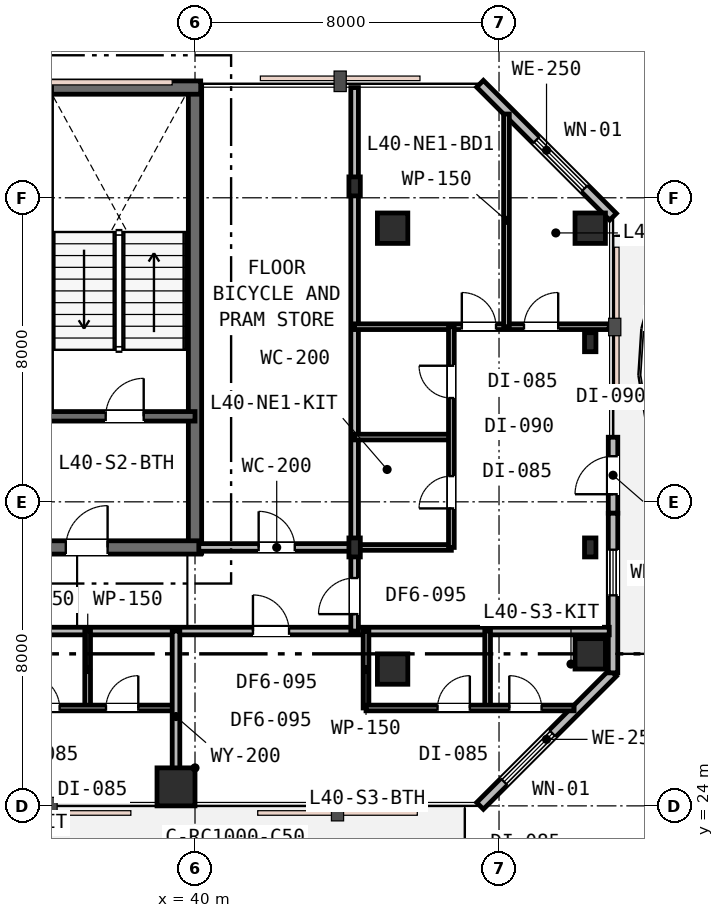
"""IFC4 building model, lengths in metres.
Left out: names, types, materials, properties, quantities, classifications, styles, units other than length and angle.
Written with IfcOpenShell. Run it as: python <this file> out.ifc"""

import sys

from ifc_helpers import new_model, si_unit, direction, frame, frame_2d, origin, origin_2d, place, context, subcontext, project, spatial, rectangle, i_section, extrude, element, fill, save


model = new_model("IFC4")
c1 = context("Model", 3, precision=1e-05, world=origin(), true_north=direction((0.0, 1.0)))
c2 = subcontext(c1, "Body", "Model", "MODEL_VIEW")
j1 = project(units=[si_unit("LENGTHUNIT", "METRE"), si_unit("PLANEANGLEUNIT", "RADIAN")], contexts=[c1])
p1 = place(None, origin())
s1 = spatial("IfcSite", under=j1, at=p1, CompositionType="ELEMENT")
p2 = place(p1, origin())
s2 = spatial("IfcBuilding", under=s1, at=p2, CompositionType="ELEMENT")
p3 = place(p2, frame((0.0, 0.0, 157.8)))
s3 = spatial("IfcBuildingStorey", under=s2, at=p3, CompositionType="ELEMENT", Elevation=157.8)
p4 = place(p3, frame((40.0, 30.65, 0.0), z_axis=(0.0, 0.0, 1.0), x_axis=(0.0, 1.0, 0.0)))
e1 = element("IfcWall", 1, at=p4, inside=s3, PredefinedType="SHEAR", context=c2, shape_type="SweptSolid", body=[
    extrude(rectangle(XDim=12.3, YDim=0.35, at=frame_2d((6.15, 0.0))), origin(), (0.0, 0.0, 1.0), 3.6),
])
p5 = place(p3, frame((15.85, 42.9, 0.0), z_axis=(0.0, 0.0, 1.0), x_axis=(1.0, 0.0, 0.0)))
e2 = element("IfcWall", 2, at=p5, inside=s3, PredefinedType="SHEAR", context=c2, shape_type="SweptSolid", body=[
    extrude(rectangle(XDim=24.3, YDim=0.35, at=frame_2d((12.15, 0.0))), origin(), (0.0, 0.0, 1.0), 3.6),
])
p6 = place(p3, frame((28.95, 30.8, 0.0), z_axis=(0.0, 0.0, 1.0), x_axis=(1.0, 0.0, 0.0)))
e3 = element("IfcWall", 3, at=p6, inside=s3, PredefinedType="SHEAR", context=c2, shape_type="SweptSolid", body=[
    extrude(rectangle(XDim=11.2, YDim=0.35, at=frame_2d((5.6, 0.0))), origin(), (0.0, 0.0, 1.0), 3.6),
])
p7 = place(p6, frame((7.65, 0.0, 0.0)))
e4 = element("IfcOpeningElement", 4, at=p7, cuts=e3, PredefinedType="OPENING", context=c2, shape_type="SweptSolid", body=[
    extrude(rectangle(XDim=1.1, YDim=2.15, at=frame_2d((0.55, 1.075))), frame((0.0, 0.185, 0.0), z_axis=(0.0, -1.0, 0.0), x_axis=(1.0, 0.0, 0.0)), (0.0, 0.0, 1.0), 0.37),
])
p8 = place(p3, frame((33.95, 34.25, 0.0), z_axis=(0.0, 0.0, 1.0), x_axis=(1.0, 0.0, 0.0)))
e5 = element("IfcWall", 5, at=p8, inside=s3, PredefinedType="SHEAR", context=c2, shape_type="SweptSolid", body=[
    extrude(rectangle(XDim=6.05, YDim=0.25, at=frame_2d((3.025, 0.0))), origin(), (0.0, 0.0, 1.0), 3.6),
])
p9 = place(p8, frame((3.7, 0.0, 0.0)))
e6 = element("IfcOpeningElement", 6, at=p9, cuts=e5, PredefinedType="OPENING", context=c2, shape_type="SweptSolid", body=[
    extrude(rectangle(XDim=1.0, YDim=2.15, at=frame_2d((0.5, 1.075))), frame((0.0, 0.135, 0.0), z_axis=(0.0, -1.0, 0.0), x_axis=(1.0, 0.0, 0.0)), (0.0, 0.0, 1.0), 0.27),
])
p10 = place(p8, frame((0.55, 0.0, 0.0)))
e7 = element("IfcOpeningElement", 7, at=p10, cuts=e5, PredefinedType="OPENING", context=c2, shape_type="SweptSolid", body=[
    extrude(rectangle(XDim=1.1, YDim=2.15, at=frame_2d((0.55, 1.075))), frame((0.0, 0.135, 0.0), z_axis=(0.0, -1.0, 0.0), x_axis=(1.0, 0.0, 0.0)), (0.0, 0.0, 1.0), 0.27),
])
p11 = place(p3, frame((39.5, 24.5, 0.0), z_axis=(0.0, 0.0, 1.0), x_axis=(1.0, 0.0, 0.0)))
e8 = element("IfcColumn", 8, at=p11, inside=s3, PredefinedType="COLUMN", context=c2, shape_type="SweptSolid", body=[
    extrude(rectangle(XDim=1.0, YDim=1.0, at=origin_2d()), origin(), (0.0, 0.0, 1.0), 3.6),
])
for number, where, z_axis, x_axis in (
    (9, (45.2, 27.6, 0.0), (0.0, 0.0, 1.0), (1.0, 0.0, 0.0)),
    (10, (45.2, 39.2, 0.0), (0.0, 0.0, 1.0), (1.0, 0.0, 0.0)),
    (11, (50.4, 28.0, 0.0), (0.0, 0.0, 1.0), (1.0, 0.0, 0.0)),
    (12, (50.4, 39.2, 0.0), (0.0, 0.0, 1.0), (1.0, 0.0, 0.0)),
):
    element("IfcColumn", number, at=place(p3, frame(where, z_axis=z_axis, x_axis=x_axis)), inside=s3, PredefinedType="COLUMN", context=c2, shape_type="SweptSolid", body=[
        extrude(rectangle(XDim=0.8, YDim=0.8, at=origin_2d()), origin(), (0.0, 0.0, 1.0), 3.6),
    ])
for number, where, z_axis, x_axis in (
    (13, (44.2, 30.8, 0.0), (0.0, 0.0, 1.0), (1.0, 0.0, 0.0)),
    (14, (44.2, 40.3, 0.0), (0.0, 0.0, 1.0), (1.0, 0.0, 0.0)),
    (15, (50.4, 30.8, 0.0), (0.0, 0.0, 1.0), (1.0, 0.0, 0.0)),
    (16, (50.4, 36.2, 0.0), (0.0, 0.0, 1.0), (1.0, 0.0, 0.0)),
):
    element("IfcColumn", number, at=place(p3, frame(where, z_axis=z_axis, x_axis=x_axis)), inside=s3, PredefinedType="COLUMN", context=c2, shape_type="SweptSolid", body=[
        extrude(i_section(OverallWidth=0.3, OverallDepth=0.5, WebThickness=0.015, FlangeThickness=0.028, FilletRadius=0.027, at=origin_2d()), origin(), (0.0, 0.0, 1.0), 3.6),
    ])
p12 = place(p3, frame((47.5, 24.0, 0.0), z_axis=(0.0, 0.0, 1.0), x_axis=(0.707106781187, 0.707106781187, 0.0)))
e17 = element("IfcWall", 17, at=p12, inside=s3, PredefinedType="STANDARD", context=c2, shape_type="SweptSolid", body=[
    extrude(rectangle(XDim=4.95, YDim=0.25, at=frame_2d((2.475, 0.0))), origin(), (0.0, 0.0, 1.0), 3.33),
])
p13 = place(p12, frame((0.896, 0.0, 0.75)))
e18 = element("IfcOpeningElement", 18, at=p13, cuts=e17, PredefinedType="OPENING", context=c2, shape_type="SweptSolid", body=[
    extrude(rectangle(XDim=1.8, YDim=1.85, at=frame_2d((0.9, 0.925))), frame((0.0, 0.135, 0.0), z_axis=(0.0, -1.0, 0.0), x_axis=(1.0, 0.0, 0.0)), (0.0, 0.0, 1.0), 0.27),
])
p14 = place(p3, frame((51.0, 31.7, 0.0), z_axis=(0.0, 0.0, 1.0), x_axis=(0.0, 1.0, 0.0)))
e19 = element("IfcWall", 19, at=p14, inside=s3, PredefinedType="STANDARD", context=c2, shape_type="SweptSolid", body=[
    extrude(rectangle(XDim=2.0, YDim=0.25, at=frame_2d((1.0, 0.0))), origin(), (0.0, 0.0, 1.0), 3.33),
])
p15 = place(p14, frame((0.5, 0.0, 0.0)))
e20 = element("IfcOpeningElement", 20, at=p15, cuts=e19, PredefinedType="OPENING", context=c2, shape_type="SweptSolid", body=[
    extrude(rectangle(XDim=1.0, YDim=2.15, at=frame_2d((0.5, 1.075))), frame((0.0, 0.135, 0.0), z_axis=(0.0, -1.0, 0.0), x_axis=(1.0, 0.0, 0.0)), (0.0, 0.0, 1.0), 0.27),
])
p16 = place(p3, frame((51.0, 27.5, 0.0), z_axis=(0.0, 0.0, 1.0), x_axis=(0.0, 1.0, 0.0)))
e21 = element("IfcWall", 21, at=p16, inside=s3, PredefinedType="STANDARD", context=c2, shape_type="SweptSolid", body=[
    extrude(rectangle(XDim=4.2, YDim=0.25, at=frame_2d((2.1, 0.0))), origin(), (0.0, 0.0, 1.0), 3.33),
])
p17 = place(p16, frame((2.04, 0.0, 0.85)))
e22 = element("IfcOpeningElement", 22, at=p17, cuts=e21, PredefinedType="OPENING", context=c2, shape_type="SweptSolid", body=[
    extrude(rectangle(XDim=1.2, YDim=1.6, at=frame_2d((0.6, 0.8))), frame((0.0, 0.135, 0.0), z_axis=(0.0, -1.0, 0.0), x_axis=(1.0, 0.0, 0.0)), (0.0, 0.0, 1.0), 0.27),
])
p18 = place(p3, frame((51.0, 39.5, 0.0), z_axis=(0.0, 0.0, 1.0), x_axis=(-0.707106781187, 0.707106781187, 0.0)))
e23 = element("IfcWall", 23, at=p18, inside=s3, PredefinedType="STANDARD", context=c2, shape_type="SweptSolid", body=[
    extrude(rectangle(XDim=4.95, YDim=0.25, at=frame_2d((2.475, 0.0))), origin(), (0.0, 0.0, 1.0), 3.33),
])
p19 = place(p18, frame((1.057, 0.0, 0.75)))
e24 = element("IfcOpeningElement", 24, at=p19, cuts=e23, PredefinedType="OPENING", context=c2, shape_type="SweptSolid", body=[
    extrude(rectangle(XDim=1.8, YDim=1.85, at=frame_2d((0.9, 0.925))), frame((0.0, 0.135, 0.0), z_axis=(0.0, -1.0, 0.0), x_axis=(1.0, 0.0, 0.0)), (0.0, 0.0, 1.0), 0.27),
])
p20 = place(p3, frame((19.6, 28.6, 0.0), z_axis=(0.0, 0.0, 1.0), x_axis=(1.0, 0.0, 0.0)))
e25 = element("IfcWall", 25, at=p20, inside=s3, PredefinedType="PARTITIONING", context=c2, shape_type="SweptSolid", body=[
    extrude(rectangle(XDim=31.3, YDim=0.2, at=frame_2d((15.65, 0.0))), origin(), (0.0, 0.0, 1.0), 2.93),
])
p21 = place(p20, frame((5.445, 0.0, 0.0)))
e26 = element("IfcOpeningElement", 26, at=p21, cuts=e25, PredefinedType="OPENING", context=c2, shape_type="SweptSolid", body=[
    extrude(rectangle(XDim=0.95, YDim=2.15, at=frame_2d((0.475, 1.075))), frame((0.0, 0.11, 0.0), z_axis=(0.0, -1.0, 0.0), x_axis=(1.0, 0.0, 0.0)), (0.0, 0.0, 1.0), 0.22),
])
p22 = place(p20, frame((13.35, 0.0, 0.0)))
e27 = element("IfcOpeningElement", 27, at=p22, cuts=e25, PredefinedType="OPENING", context=c2, shape_type="SweptSolid", body=[
    extrude(rectangle(XDim=0.95, YDim=2.15, at=frame_2d((0.475, 1.075))), frame((0.0, 0.11, 0.0), z_axis=(0.0, -1.0, 0.0), x_axis=(1.0, 0.0, 0.0)), (0.0, 0.0, 1.0), 0.22),
])
p23 = place(p20, frame((21.925, 0.0, 0.0)))
e28 = element("IfcOpeningElement", 28, at=p23, cuts=e25, PredefinedType="OPENING", context=c2, shape_type="SweptSolid", body=[
    extrude(rectangle(XDim=0.95, YDim=2.15, at=frame_2d((0.475, 1.075))), frame((0.0, 0.11, 0.0), z_axis=(0.0, -1.0, 0.0), x_axis=(1.0, 0.0, 0.0)), (0.0, 0.0, 1.0), 0.22),
])
p24 = place(p3, frame((40.1, 30.8, 0.0), z_axis=(0.0, 0.0, 1.0), x_axis=(1.0, 0.0, 0.0)))
e29 = element("IfcWall", 29, at=p24, inside=s3, PredefinedType="PARTITIONING", context=c2, shape_type="SweptSolid", body=[
    extrude(rectangle(XDim=4.1, YDim=0.2, at=frame_2d((2.05, 0.0))), origin(), (0.0, 0.0, 1.0), 2.93),
])
p25 = place(p24, frame((1.575, 0.0, 0.0)))
e30 = element("IfcOpeningElement", 30, at=p25, cuts=e29, PredefinedType="OPENING", context=c2, shape_type="SweptSolid", body=[
    extrude(rectangle(XDim=0.95, YDim=2.15, at=frame_2d((0.475, 1.075))), frame((0.0, 0.11, 0.0), z_axis=(0.0, -1.0, 0.0), x_axis=(1.0, 0.0, 0.0)), (0.0, 0.0, 1.0), 0.22),
])
p26 = place(p3, frame((44.2, 28.6, 0.0), z_axis=(0.0, 0.0, 1.0), x_axis=(0.0, 1.0, 0.0)))
e31 = element("IfcWall", 31, at=p26, inside=s3, PredefinedType="PARTITIONING", context=c2, shape_type="SweptSolid", body=[
    extrude(rectangle(XDim=14.3, YDim=0.2, at=frame_2d((7.15, 0.0))), origin(), (0.0, 0.0, 1.0), 2.93),
])
p27 = place(p26, frame((0.445, 0.0, 0.0)))
e32 = element("IfcOpeningElement", 32, at=p27, cuts=e31, PredefinedType="OPENING", context=c2, shape_type="SweptSolid", body=[
    extrude(rectangle(XDim=0.95, YDim=2.15, at=frame_2d((0.475, 1.075))), frame((0.0, 0.11, 0.0), z_axis=(0.0, -1.0, 0.0), x_axis=(1.0, 0.0, 0.0)), (0.0, 0.0, 1.0), 0.22),
])
for number, where, z_axis, x_axis in (
    (33, (44.2, 30.8, 0.0), (0.0, 0.0, 1.0), (1.0, 0.0, 0.0)),
    (34, (44.2, 33.704, 0.0), (0.0, 0.0, 1.0), (1.0, 0.0, 0.0)),
):
    element("IfcWall", number, at=place(p3, frame(where, z_axis=z_axis, x_axis=x_axis)), inside=s3, PredefinedType="PARTITIONING", context=c2, shape_type="SweptSolid", body=[
        extrude(rectangle(XDim=2.546, YDim=0.15, at=frame_2d((1.273, 0.0))), origin(), (0.0, 0.0, 1.0), 2.93),
    ])
p28 = place(p3, frame((44.2, 36.608, 0.0), z_axis=(0.0, 0.0, 1.0), x_axis=(1.0, 0.0, 0.0)))
e35 = element("IfcWall", 35, at=p28, inside=s3, PredefinedType="PARTITIONING", context=c2, shape_type="SweptSolid", body=[
    extrude(rectangle(XDim=6.7, YDim=0.15, at=frame_2d((3.35, 0.0))), origin(), (0.0, 0.0, 1.0), 2.93),
])
p29 = place(p28, frame((2.821, 0.0, 0.0)))
e36 = element("IfcOpeningElement", 36, at=p29, cuts=e35, PredefinedType="OPENING", context=c2, shape_type="SweptSolid", body=[
    extrude(rectangle(XDim=0.9, YDim=2.15, at=frame_2d((0.45, 1.075))), frame((0.0, 0.085, 0.0), z_axis=(0.0, -1.0, 0.0), x_axis=(1.0, 0.0, 0.0)), (0.0, 0.0, 1.0), 0.17),
])
p30 = place(p28, frame((4.457, 0.0, 0.0)))
e37 = element("IfcOpeningElement", 37, at=p30, cuts=e35, PredefinedType="OPENING", context=c2, shape_type="SweptSolid", body=[
    extrude(rectangle(XDim=0.9, YDim=2.15, at=frame_2d((0.45, 1.075))), frame((0.0, 0.085, 0.0), z_axis=(0.0, -1.0, 0.0), x_axis=(1.0, 0.0, 0.0)), (0.0, 0.0, 1.0), 0.17),
])
p31 = place(p3, frame((46.746, 30.8, 0.0), z_axis=(0.0, 0.0, 1.0), x_axis=(0.0, 1.0, 0.0)))
e38 = element("IfcWall", 38, at=p31, inside=s3, PredefinedType="PARTITIONING", context=c2, shape_type="SweptSolid", body=[
    extrude(rectangle(XDim=5.808, YDim=0.15, at=frame_2d((2.904, 0.0))), origin(), (0.0, 0.0, 1.0), 2.93),
])
p32 = place(p31, frame((1.027, 0.0, 0.0)))
e39 = element("IfcOpeningElement", 39, at=p32, cuts=e38, PredefinedType="OPENING", context=c2, shape_type="SweptSolid", body=[
    extrude(rectangle(XDim=0.85, YDim=2.15, at=frame_2d((0.425, 1.075))), frame((0.0, 0.085, 0.0), z_axis=(0.0, -1.0, 0.0), x_axis=(1.0, 0.0, 0.0)), (0.0, 0.0, 1.0), 0.17),
])
p33 = place(p31, frame((3.931, 0.0, 0.0)))
e40 = element("IfcOpeningElement", 40, at=p33, cuts=e38, PredefinedType="OPENING", context=c2, shape_type="SweptSolid", body=[
    extrude(rectangle(XDim=0.85, YDim=2.15, at=frame_2d((0.425, 1.075))), frame((0.0, 0.085, 0.0), z_axis=(0.0, -1.0, 0.0), x_axis=(1.0, 0.0, 0.0)), (0.0, 0.0, 1.0), 0.17),
])
p34 = place(p3, frame((48.196, 36.608, 0.0), z_axis=(0.0, 0.0, 1.0), x_axis=(0.0, 1.0, 0.0)))
e41 = element("IfcWall", 41, at=p34, inside=s3, PredefinedType="PARTITIONING", context=c2, shape_type="SweptSolid", body=[
    extrude(rectangle(XDim=5.596, YDim=0.15, at=frame_2d((2.798, 0.0))), origin(), (0.0, 0.0, 1.0), 3.01),
])
p35 = place(p3, frame((37.175, 26.576, 0.0), z_axis=(0.0, 0.0, 1.0), x_axis=(0.0, 1.0, 0.0)))
e42 = element("IfcWall", 42, at=p35, inside=s3, PredefinedType="PARTITIONING", context=c2, shape_type="SweptSolid", body=[
    extrude(rectangle(XDim=2.024, YDim=0.15, at=frame_2d((1.012, 0.0))), origin(), (0.0, 0.0, 1.0), 2.96),
])
p36 = place(p3, frame((34.85, 26.576, 0.0), z_axis=(0.0, 0.0, 1.0), x_axis=(1.0, 0.0, 0.0)))
e43 = element("IfcWall", 43, at=p36, inside=s3, PredefinedType="PARTITIONING", context=c2, shape_type="SweptSolid", body=[
    extrude(rectangle(XDim=4.65, YDim=0.15, at=frame_2d((2.325, 0.0))), origin(), (0.0, 0.0, 1.0), 2.93),
])
p37 = place(p36, frame((0.738, 0.0, 0.0)))
e44 = element("IfcOpeningElement", 44, at=p37, cuts=e43, PredefinedType="OPENING", context=c2, shape_type="SweptSolid", body=[
    extrude(rectangle(XDim=0.85, YDim=2.15, at=frame_2d((0.425, 1.075))), frame((0.0, 0.085, 0.0), z_axis=(0.0, -1.0, 0.0), x_axis=(1.0, 0.0, 0.0)), (0.0, 0.0, 1.0), 0.17),
])
p38 = place(p36, frame((2.808, 0.0, 0.0)))
e45 = element("IfcOpeningElement", 45, at=p38, cuts=e43, PredefinedType="OPENING", context=c2, shape_type="SweptSolid", body=[
    extrude(rectangle(XDim=0.85, YDim=2.15, at=frame_2d((0.425, 1.075))), frame((0.0, 0.085, 0.0), z_axis=(0.0, -1.0, 0.0), x_axis=(1.0, 0.0, 0.0)), (0.0, 0.0, 1.0), 0.17),
])
p39 = place(p3, frame((39.5, 24.1, 0.0), z_axis=(0.0, 0.0, 1.0), x_axis=(0.0, 1.0, 0.0)))
e46 = element("IfcWall", 46, at=p39, inside=s3, PredefinedType="PARTITIONING", context=c2, shape_type="SweptSolid", body=[
    extrude(rectangle(XDim=4.5, YDim=0.2, at=frame_2d((2.25, 0.0))), origin(), (0.0, 0.0, 1.0), 2.93),
])
for number, where, z_axis, x_axis in (
    (47, (44.5, 26.576, 0.0), (0.0, 0.0, 1.0), (0.0, 1.0, 0.0)),
    (48, (47.7, 26.576, 0.0), (0.0, 0.0, 1.0), (0.0, 1.0, 0.0)),
):
    element("IfcWall", number, at=place(p3, frame(where, z_axis=z_axis, x_axis=x_axis)), inside=s3, PredefinedType="PARTITIONING", context=c2, shape_type="SweptSolid", body=[
        extrude(rectangle(XDim=2.024, YDim=0.15, at=frame_2d((1.012, 0.0))), origin(), (0.0, 0.0, 1.0), 3.33),
    ])
p40 = place(p3, frame((44.5, 26.576, 0.0), z_axis=(0.0, 0.0, 1.0), x_axis=(1.0, 0.0, 0.0)))
e49 = element("IfcWall", 49, at=p40, inside=s3, PredefinedType="PARTITIONING", context=c2, shape_type="SweptSolid", body=[
    extrude(rectangle(XDim=5.476, YDim=0.15, at=frame_2d((2.738, 0.0))), origin(), (0.0, 0.0, 1.0), 3.33),
])
p41 = place(p40, frame((1.882, 0.0, 0.0)))
e50 = element("IfcOpeningElement", 50, at=p41, cuts=e49, PredefinedType="OPENING", context=c2, shape_type="SweptSolid", body=[
    extrude(rectangle(XDim=0.85, YDim=2.15, at=frame_2d((0.425, 1.075))), frame((0.0, 0.085, 0.0), z_axis=(0.0, -1.0, 0.0), x_axis=(1.0, 0.0, 0.0)), (0.0, 0.0, 1.0), 0.17),
])
p42 = place(p40, frame((3.77, 0.0, 0.0)))
e51 = element("IfcOpeningElement", 51, at=p42, cuts=e49, PredefinedType="OPENING", context=c2, shape_type="SweptSolid", body=[
    extrude(rectangle(XDim=0.85, YDim=2.15, at=frame_2d((0.425, 1.075))), frame((0.0, 0.085, 0.0), z_axis=(0.0, -1.0, 0.0), x_axis=(1.0, 0.0, 0.0)), (0.0, 0.0, 1.0), 0.17),
])
p43 = place(p13, origin())
e52 = element("IfcWindow", 52, at=p43, inside=s3, PartitioningType="SINGLE_PANEL", PredefinedType="WINDOW", context=c2, shape_type="SweptSolid", body=[
    extrude(rectangle(XDim=1.8, YDim=1.85, at=frame_2d((0.9, 0.925))), frame((0.0, 0.03, 0.0), z_axis=(0.0, -1.0, 0.0), x_axis=(1.0, 0.0, 0.0)), (0.0, 0.0, 1.0), 0.06),
])
fill(e18, e52)
p44 = place(p15, origin())
e53 = element("IfcDoor", 53, at=p44, inside=s3, OperationType="SINGLE_SWING_LEFT", PredefinedType="DOOR", context=c2, shape_type="SweptSolid", body=[
    extrude(rectangle(XDim=1.0, YDim=2.15, at=frame_2d((0.5, 1.075))), frame((0.0, 0.025, 0.0), z_axis=(0.0, -1.0, 0.0), x_axis=(1.0, 0.0, 0.0)), (0.0, 0.0, 1.0), 0.05),
])
fill(e20, e53)
p45 = place(p17, origin())
e54 = element("IfcWindow", 54, at=p45, inside=s3, PartitioningType="SINGLE_PANEL", PredefinedType="WINDOW", context=c2, shape_type="SweptSolid", body=[
    extrude(rectangle(XDim=1.2, YDim=1.6, at=frame_2d((0.6, 0.8))), frame((0.0, 0.03, 0.0), z_axis=(0.0, -1.0, 0.0), x_axis=(1.0, 0.0, 0.0)), (0.0, 0.0, 1.0), 0.06),
])
fill(e22, e54)
p46 = place(p19, origin())
e55 = element("IfcWindow", 55, at=p46, inside=s3, PartitioningType="SINGLE_PANEL", PredefinedType="WINDOW", context=c2, shape_type="SweptSolid", body=[
    extrude(rectangle(XDim=1.8, YDim=1.85, at=frame_2d((0.9, 0.925))), frame((0.0, 0.03, 0.0), z_axis=(0.0, -1.0, 0.0), x_axis=(1.0, 0.0, 0.0)), (0.0, 0.0, 1.0), 0.06),
])
fill(e24, e55)
p47 = place(p9, origin())
e56 = element("IfcDoor", 56, at=p47, inside=s3, OperationType="SINGLE_SWING_RIGHT", PredefinedType="DOOR", context=c2, shape_type="SweptSolid", body=[
    extrude(rectangle(XDim=1.0, YDim=2.15, at=frame_2d((0.5, 1.075))), frame((0.0, 0.025, 0.0), z_axis=(0.0, -1.0, 0.0), x_axis=(1.0, 0.0, 0.0)), (0.0, 0.0, 1.0), 0.05),
])
fill(e6, e56)
p48 = place(p7, origin())
e57 = element("IfcDoor", 57, at=p48, inside=s3, OperationType="SINGLE_SWING_RIGHT", PredefinedType="DOOR", context=c2, shape_type="SweptSolid", body=[
    extrude(rectangle(XDim=1.1, YDim=2.15, at=frame_2d((0.55, 1.075))), frame((0.0, 0.025, 0.0), z_axis=(0.0, -1.0, 0.0), x_axis=(1.0, 0.0, 0.0)), (0.0, 0.0, 1.0), 0.05),
])
fill(e4, e57)
p49 = place(p25, origin())
e58 = element("IfcDoor", 58, at=p49, inside=s3, OperationType="SINGLE_SWING_LEFT", PredefinedType="DOOR", context=c2, shape_type="SweptSolid", body=[
    extrude(rectangle(XDim=0.95, YDim=2.15, at=frame_2d((0.475, 1.075))), frame((0.0, 0.025, 0.0), z_axis=(0.0, -1.0, 0.0), x_axis=(1.0, 0.0, 0.0)), (0.0, 0.0, 1.0), 0.05),
])
fill(e30, e58)
p50 = place(p27, origin())
e59 = element("IfcDoor", 59, at=p50, inside=s3, OperationType="SINGLE_SWING_LEFT", PredefinedType="DOOR", context=c2, shape_type="SweptSolid", body=[
    extrude(rectangle(XDim=0.95, YDim=2.15, at=frame_2d((0.475, 1.075))), frame((0.0, 0.025, 0.0), z_axis=(0.0, -1.0, 0.0), x_axis=(1.0, 0.0, 0.0)), (0.0, 0.0, 1.0), 0.05),
])
fill(e32, e59)
p51 = place(p32, origin())
e60 = element("IfcDoor", 60, at=p51, inside=s3, OperationType="SINGLE_SWING_LEFT", PredefinedType="DOOR", context=c2, shape_type="SweptSolid", body=[
    extrude(rectangle(XDim=0.85, YDim=2.15, at=frame_2d((0.425, 1.075))), frame((0.0, 0.025, 0.0), z_axis=(0.0, -1.0, 0.0), x_axis=(1.0, 0.0, 0.0)), (0.0, 0.0, 1.0), 0.05),
])
fill(e39, e60)
p52 = place(p33, origin())
e61 = element("IfcDoor", 61, at=p52, inside=s3, OperationType="SINGLE_SWING_RIGHT", PredefinedType="DOOR", context=c2, shape_type="SweptSolid", body=[
    extrude(rectangle(XDim=0.85, YDim=2.15, at=frame_2d((0.425, 1.075))), frame((0.0, 0.025, 0.0), z_axis=(0.0, -1.0, 0.0), x_axis=(1.0, 0.0, 0.0)), (0.0, 0.0, 1.0), 0.05),
])
fill(e40, e61)
p53 = place(p29, origin())
e62 = element("IfcDoor", 62, at=p53, inside=s3, OperationType="SINGLE_SWING_LEFT", PredefinedType="DOOR", context=c2, shape_type="SweptSolid", body=[
    extrude(rectangle(XDim=0.9, YDim=2.15, at=frame_2d((0.45, 1.075))), frame((0.0, 0.025, 0.0), z_axis=(0.0, -1.0, 0.0), x_axis=(1.0, 0.0, 0.0)), (0.0, 0.0, 1.0), 0.05),
])
fill(e36, e62)
p54 = place(p30, origin())
e63 = element("IfcDoor", 63, at=p54, inside=s3, OperationType="SINGLE_SWING_RIGHT", PredefinedType="DOOR", context=c2, shape_type="SweptSolid", body=[
    extrude(rectangle(XDim=0.9, YDim=2.15, at=frame_2d((0.45, 1.075))), frame((0.0, 0.025, 0.0), z_axis=(0.0, -1.0, 0.0), x_axis=(1.0, 0.0, 0.0)), (0.0, 0.0, 1.0), 0.05),
])
fill(e37, e63)
p55 = place(p37, origin())
e64 = element("IfcDoor", 64, at=p55, inside=s3, OperationType="SINGLE_SWING_LEFT", PredefinedType="DOOR", context=c2, shape_type="SweptSolid", body=[
    extrude(rectangle(XDim=0.85, YDim=2.15, at=frame_2d((0.425, 1.075))), frame((0.0, 0.025, 0.0), z_axis=(0.0, -1.0, 0.0), x_axis=(1.0, 0.0, 0.0)), (0.0, 0.0, 1.0), 0.05),
])
fill(e44, e64)
p56 = place(p38, origin())
e65 = element("IfcDoor", 65, at=p56, inside=s3, OperationType="SINGLE_SWING_RIGHT", PredefinedType="DOOR", context=c2, shape_type="SweptSolid", body=[
    extrude(rectangle(XDim=0.85, YDim=2.15, at=frame_2d((0.425, 1.075))), frame((0.0, 0.025, 0.0), z_axis=(0.0, -1.0, 0.0), x_axis=(1.0, 0.0, 0.0)), (0.0, 0.0, 1.0), 0.05),
])
fill(e45, e65)
p57 = place(p23, origin())
e66 = element("IfcDoor", 66, at=p57, inside=s3, OperationType="SINGLE_SWING_LEFT", PredefinedType="DOOR", context=c2, shape_type="SweptSolid", body=[
    extrude(rectangle(XDim=0.95, YDim=2.15, at=frame_2d((0.475, 1.075))), frame((0.0, 0.025, 0.0), z_axis=(0.0, -1.0, 0.0), x_axis=(1.0, 0.0, 0.0)), (0.0, 0.0, 1.0), 0.05),
])
fill(e28, e66)
p58 = place(p41, origin())
e67 = element("IfcDoor", 67, at=p58, inside=s3, OperationType="SINGLE_SWING_RIGHT", PredefinedType="DOOR", context=c2, shape_type="SweptSolid", body=[
    extrude(rectangle(XDim=0.85, YDim=2.15, at=frame_2d((0.425, 1.075))), frame((0.0, 0.025, 0.0), z_axis=(0.0, -1.0, 0.0), x_axis=(1.0, 0.0, 0.0)), (0.0, 0.0, 1.0), 0.05),
])
fill(e50, e67)
p59 = place(p42, origin())
e68 = element("IfcDoor", 68, at=p59, inside=s3, OperationType="SINGLE_SWING_LEFT", PredefinedType="DOOR", context=c2, shape_type="SweptSolid", body=[
    extrude(rectangle(XDim=0.85, YDim=2.15, at=frame_2d((0.425, 1.075))), frame((0.0, 0.025, 0.0), z_axis=(0.0, -1.0, 0.0), x_axis=(1.0, 0.0, 0.0)), (0.0, 0.0, 1.0), 0.05),
])
fill(e51, e68)
save(model, sys.argv[1])
